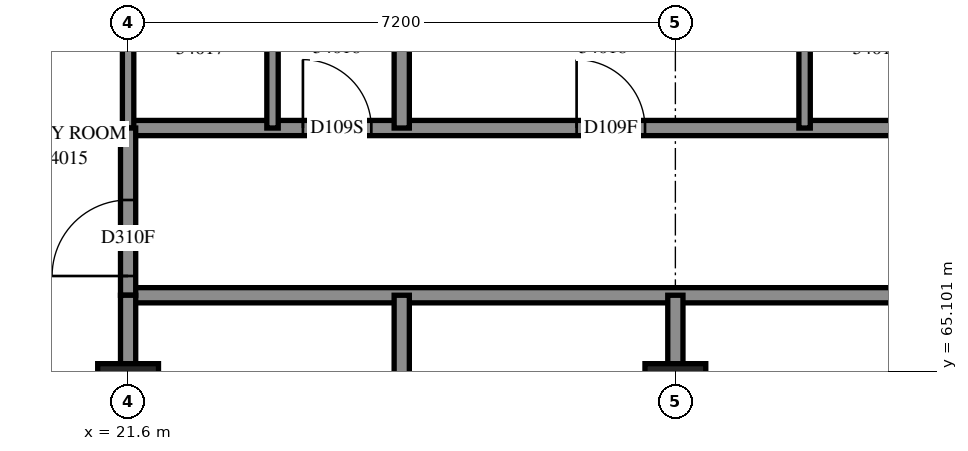
"""IFC4 building model, lengths in metres.
Left out: names, types, materials, properties, quantities, classifications, styles, units other than length and angle.
Written with IfcOpenShell. Run it as: python <this file> out.ifc"""

import sys

from ifc_helpers import new_model, si_unit, direction, frame, frame_2d, origin, origin_2d, place, context, subcontext, project, spatial, rectangle, extrude, element, fill, save


model = new_model("IFC4")
c1 = context("Model", 3, precision=1e-05, world=origin(), true_north=direction((0.0, 1.0)))
c2 = subcontext(c1, "Body", "Model", "MODEL_VIEW")
j1 = project(units=[si_unit("LENGTHUNIT", "METRE"), si_unit("PLANEANGLEUNIT", "RADIAN")], contexts=[c1])
p1 = place(None, origin())
s1 = spatial("IfcSite", under=j1, at=p1, CompositionType="ELEMENT")
p2 = place(p1, origin())
s2 = spatial("IfcBuilding", under=s1, at=p2, CompositionType="ELEMENT")
p3 = place(p2, frame((0.0, 0.0, 199.8)))
s3 = spatial("IfcBuildingStorey", under=s2, at=p3, CompositionType="ELEMENT", Elevation=199.8)
for number, where, z_axis, x_axis in (
    (1, (21.6, 64.8, 0.0), (0.0, 0.0, 1.0), (1.0, 0.0, 0.0)),
    (2, (28.8, 64.8, 0.0), (0.0, 0.0, 1.0), (1.0, 0.0, 0.0)),
):
    element("IfcColumn", number, at=place(p3, frame(where, z_axis=z_axis, x_axis=x_axis)), inside=s3, PredefinedType="COLUMN", context=c2, shape_type="SweptSolid", body=[
        extrude(rectangle(XDim=0.8, YDim=0.8, at=origin_2d()), origin(), (0.0, 0.0, 1.0), 3.1),
    ])
p4 = place(p3, frame((21.6, 68.3, 0.0), z_axis=(0.0, 0.0, 1.0), x_axis=(1.0, 0.0, 0.0)))
e3 = element("IfcWall", 3, at=p4, inside=s3, PredefinedType="PARTITIONING", context=c2, shape_type="SweptSolid", body=[
    extrude(rectangle(XDim=19.1, YDim=0.2, at=frame_2d((9.55, 0.0))), origin(), (0.0, 0.0, 1.0), 3.1),
])
p5 = place(p4, frame((2.3, 0.0, 0.0)))
e4 = element("IfcOpeningElement", 4, at=p5, cuts=e3, PredefinedType="OPENING", context=c2, shape_type="SweptSolid", body=[
    extrude(rectangle(XDim=0.9, YDim=2.1, at=frame_2d((0.45, 1.05))), frame((0.0, 0.11, 0.0), z_axis=(0.0, -1.0, 0.0), x_axis=(1.0, 0.0, 0.0)), (0.0, 0.0, 1.0), 0.22),
])
p6 = place(p4, frame((5.901, 0.0, 0.0)))
e5 = element("IfcOpeningElement", 5, at=p6, cuts=e3, PredefinedType="OPENING", context=c2, shape_type="SweptSolid", body=[
    extrude(rectangle(XDim=0.9, YDim=2.1, at=frame_2d((0.45, 1.05))), frame((0.0, 0.11, 0.0), z_axis=(0.0, -1.0, 0.0), x_axis=(1.0, 0.0, 0.0)), (0.0, 0.0, 1.0), 0.22),
])
p7 = place(p4, frame((13.139, 0.0, 0.0)))
e6 = element("IfcOpeningElement", 6, at=p7, cuts=e3, PredefinedType="OPENING", context=c2, shape_type="SweptSolid", body=[
    extrude(rectangle(XDim=0.9, YDim=2.1, at=frame_2d((0.45, 1.05))), frame((0.0, 0.11, 0.0), z_axis=(0.0, -1.0, 0.0), x_axis=(1.0, 0.0, 0.0)), (0.0, 0.0, 1.0), 0.22),
])
p8 = place(p3, frame((21.6, 66.1, 0.0), z_axis=(0.0, 0.0, 1.0), x_axis=(1.0, 0.0, 0.0)))
e7 = element("IfcWall", 7, at=p8, inside=s3, PredefinedType="PARTITIONING", context=c2, shape_type="SweptSolid", body=[
    extrude(rectangle(XDim=16.9, YDim=0.2, at=frame_2d((8.45, 0.0))), origin(), (0.0, 0.0, 1.0), 3.1),
])
p9 = place(p8, frame((12.493, 0.0, 0.0)))
e8 = element("IfcOpeningElement", 8, at=p9, cuts=e7, PredefinedType="OPENING", context=c2, shape_type="SweptSolid", body=[
    extrude(rectangle(XDim=1.0, YDim=2.1, at=frame_2d((0.5, 1.05))), frame((0.0, 0.11, 0.0), z_axis=(0.0, -1.0, 0.0), x_axis=(1.0, 0.0, 0.0)), (0.0, 0.0, 1.0), 0.22),
])
p10 = place(p3, frame((25.2, 68.3, 0.0), z_axis=(0.0, 0.0, 1.0), x_axis=(0.0, 1.0, 0.0)))
e9 = element("IfcWall", 9, at=p10, inside=s3, PredefinedType="PARTITIONING", context=c2, shape_type="SweptSolid", body=[
    extrude(rectangle(XDim=4.603, YDim=0.2, at=frame_2d((2.302, 0.0))), origin(), (0.0, 0.0, 1.0), 3.1),
])
p11 = place(p3, frame((25.2, 63.109, 0.0), z_axis=(0.0, 0.0, 1.0), x_axis=(0.0, 1.0, 0.0)))
e10 = element("IfcWall", 10, at=p11, inside=s3, PredefinedType="PARTITIONING", context=c2, shape_type="SweptSolid", body=[
    extrude(rectangle(XDim=2.991, YDim=0.2, at=frame_2d((1.496, 0.0))), origin(), (0.0, 0.0, 1.0), 3.1),
])
p12 = place(p3, frame((21.6, 68.3, 0.0), z_axis=(0.0, 0.0, 1.0), x_axis=(0.0, 1.0, 0.0)))
e11 = element("IfcWall", 11, at=p12, inside=s3, PredefinedType="PARTITIONING", context=c2, shape_type="SweptSolid", body=[
    extrude(rectangle(XDim=2.4, YDim=0.15, at=frame_2d((1.2, 0.0))), origin(), (0.0, 0.0, 1.0), 2.6),
])
for number, where, z_axis, x_axis in (
    (12, (23.5, 68.3, 0.0), (0.0, 0.0, 1.0), (0.0, 1.0, 0.0)),
    (13, (30.5, 68.3, 0.0), (0.0, 0.0, 1.0), (0.0, 1.0, 0.0)),
):
    element("IfcWall", number, at=place(p3, frame(where, z_axis=z_axis, x_axis=x_axis)), inside=s3, PredefinedType="PARTITIONING", context=c2, shape_type="SweptSolid", body=[
        extrude(rectangle(XDim=2.4, YDim=0.15, at=frame_2d((1.2, 0.0))), origin(), (0.0, 0.0, 1.0), 3.1),
    ])
p13 = place(p3, frame((21.6, 66.1, 0.0), z_axis=(0.0, 0.0, 1.0), x_axis=(0.0, 1.0, 0.0)))
e14 = element("IfcWall", 14, at=p13, inside=s3, PredefinedType="PARTITIONING", context=c2, shape_type="SweptSolid", body=[
    extrude(rectangle(XDim=2.2, YDim=0.2, at=frame_2d((1.1, 0.0))), origin(), (0.0, 0.0, 1.0), 2.6),
])
p14 = place(p13, frame((0.253, 0.0, 0.0)))
e15 = element("IfcOpeningElement", 15, at=p14, cuts=e14, PredefinedType="OPENING", context=c2, shape_type="SweptSolid", body=[
    extrude(rectangle(XDim=1.0, YDim=2.1, at=frame_2d((0.5, 1.05))), frame((0.0, 0.11, 0.0), z_axis=(0.0, -1.0, 0.0), x_axis=(1.0, 0.0, 0.0)), (0.0, 0.0, 1.0), 0.22),
])
p15 = place(p3, frame((21.6, 65.2, 0.0), z_axis=(0.0, 0.0, 1.0), x_axis=(0.0, 1.0, 0.0)))
e16 = element("IfcWall", 16, at=p15, inside=s3, PredefinedType="PARTITIONING", context=c2, shape_type="SweptSolid", body=[
    extrude(rectangle(XDim=0.9, YDim=0.2, at=frame_2d((0.45, 0.0))), origin(), (0.0, 0.0, 1.0), 2.6),
])
p16 = place(p3, frame((28.8, 65.2, 0.0), z_axis=(0.0, 0.0, 1.0), x_axis=(0.0, 1.0, 0.0)))
e17 = element("IfcWall", 17, at=p16, inside=s3, PredefinedType="PARTITIONING", context=c2, shape_type="SweptSolid", body=[
    extrude(rectangle(XDim=0.9, YDim=0.2, at=frame_2d((0.45, 0.0))), origin(), (0.0, 0.0, 1.0), 3.1),
])
p17 = place(p14, origin())
e18 = element("IfcDoor", 18, at=p17, inside=s3, OperationType="SINGLE_SWING_RIGHT", PredefinedType="DOOR", context=c2, shape_type="SweptSolid", body=[
    extrude(rectangle(XDim=1.0, YDim=2.1, at=frame_2d((0.5, 1.05))), frame((0.0, 0.025, 0.0), z_axis=(0.0, -1.0, 0.0), x_axis=(1.0, 0.0, 0.0)), (0.0, 0.0, 1.0), 0.05),
])
fill(e15, e18)
p18 = place(p5, origin())
e19 = element("IfcDoor", 19, at=p18, inside=s3, OperationType="SINGLE_SWING_RIGHT", PredefinedType="DOOR", context=c2, shape_type="SweptSolid", body=[
    extrude(rectangle(XDim=0.9, YDim=2.1, at=frame_2d((0.45, 1.05))), frame((0.0, 0.025, 0.0), z_axis=(0.0, -1.0, 0.0), x_axis=(1.0, 0.0, 0.0)), (0.0, 0.0, 1.0), 0.05),
])
fill(e4, e19)
p19 = place(p6, origin())
e20 = element("IfcDoor", 20, at=p19, inside=s3, OperationType="SINGLE_SWING_LEFT", PredefinedType="DOOR", context=c2, shape_type="SweptSolid", body=[
    extrude(rectangle(XDim=0.9, YDim=2.1, at=frame_2d((0.45, 1.05))), frame((0.0, 0.025, 0.0), z_axis=(0.0, -1.0, 0.0), x_axis=(1.0, 0.0, 0.0)), (0.0, 0.0, 1.0), 0.05),
])
fill(e5, e20)
save(model, sys.argv[1])
